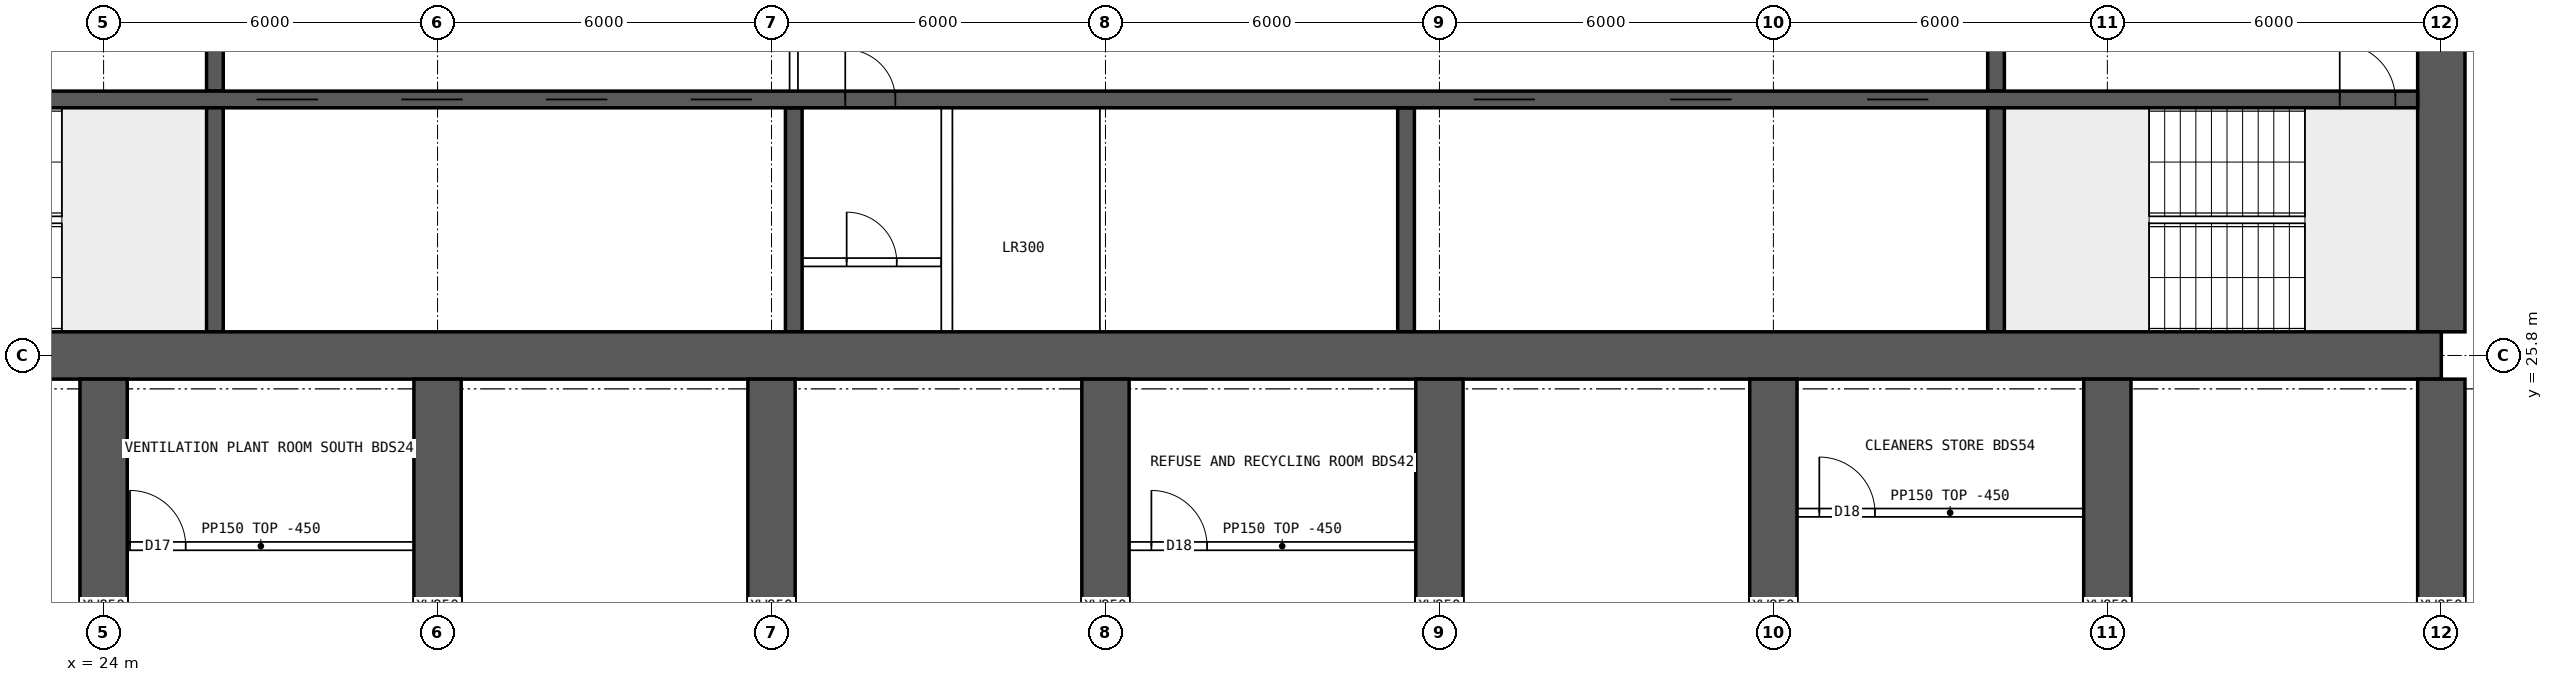
"""IFC4 building model, lengths in metres.
Left out: names, types, materials, properties, quantities, classifications, styles, units other than length and angle.
Written with IfcOpenShell. Run it as: python <this file> out.ifc"""

import sys

from ifc_helpers import new_model, si_unit, direction, frame, frame_2d, origin, place, context, subcontext, project, spatial, rectangle, extrude, element, fill, save


model = new_model("IFC4")
c1 = context("Model", 3, precision=1e-05, world=origin(), true_north=direction((0.0, 1.0)))
c2 = subcontext(c1, "Body", "Model", "MODEL_VIEW")
j1 = project(units=[si_unit("LENGTHUNIT", "METRE"), si_unit("PLANEANGLEUNIT", "RADIAN")], contexts=[c1])
p1 = place(None, origin())
s1 = spatial("IfcSite", under=j1, at=p1, CompositionType="ELEMENT")
p2 = place(p1, origin())
s2 = spatial("IfcBuilding", under=s1, at=p2, CompositionType="ELEMENT")
p3 = place(p2, frame((0.0, 0.0, 144.85)))
s3 = spatial("IfcBuildingStorey", under=s2, at=p3, CompositionType="ELEMENT", Elevation=144.85)
p4 = place(p3, frame((18.0, 25.8, 0.0), z_axis=(0.0, 0.0, 1.0), x_axis=(1.0, 0.0, 0.0)))
e1 = element("IfcWall", 1, at=p4, inside=s3, PredefinedType="SHEAR", context=c2, shape_type="SweptSolid", body=[
    extrude(rectangle(XDim=48.0, YDim=0.85, at=frame_2d((24.0, 0.0))), origin(), (0.0, 0.0, 1.0), 3.75),
])
p5 = place(p3, frame((66.0, 26.225, 0.0), z_axis=(0.0, 0.0, 1.0), x_axis=(0.0, 1.0, 0.0)))
e2 = element("IfcWall", 2, at=p5, inside=s3, PredefinedType="SHEAR", context=c2, shape_type="SweptSolid", body=[
    extrude(rectangle(XDim=11.55, YDim=0.85, at=frame_2d((5.775, 0.0))), origin(), (0.0, 0.0, 1.0), 3.75),
])
p6 = place(p5, frame((5.075, 0.0, 0.0)))
e3 = element("IfcOpeningElement", 3, at=p6, cuts=e2, PredefinedType="OPENING", context=c2, shape_type="SweptSolid", body=[
    extrude(rectangle(XDim=1.2, YDim=2.1, at=frame_2d((0.6, 1.05))), frame((0.0, 0.435, 0.0), z_axis=(0.0, -1.0, 0.0), x_axis=(1.0, 0.0, 0.0)), (0.0, 0.0, 1.0), 0.87),
])
p7 = place(p3, frame((18.425, 30.4, 0.0), z_axis=(0.0, 0.0, 1.0), x_axis=(1.0, 0.0, 0.0)))
e4 = element("IfcWall", 4, at=p7, inside=s3, PredefinedType="SHEAR", context=c2, shape_type="SweptSolid", body=[
    extrude(rectangle(XDim=47.15, YDim=0.3, at=frame_2d((23.575, 0.0))), origin(), (0.0, 0.0, 1.0), 3.75),
])
p8 = place(p7, frame((0.4, 0.0, 0.0)))
e5 = element("IfcOpeningElement", 5, at=p8, cuts=e4, PredefinedType="OPENING", context=c2, shape_type="SweptSolid", body=[
    extrude(rectangle(XDim=1.0, YDim=2.1, at=frame_2d((0.5, 1.05))), frame((0.0, 0.16, 0.0), z_axis=(0.0, -1.0, 0.0), x_axis=(1.0, 0.0, 0.0)), (0.0, 0.0, 1.0), 0.32),
])
p9 = place(p7, frame((45.75, 0.0, 0.0)))
e6 = element("IfcOpeningElement", 6, at=p9, cuts=e4, PredefinedType="OPENING", context=c2, shape_type="SweptSolid", body=[
    extrude(rectangle(XDim=1.0, YDim=2.1, at=frame_2d((0.5, 1.05))), frame((0.0, 0.16, 0.0), z_axis=(0.0, -1.0, 0.0), x_axis=(1.0, 0.0, 0.0)), (0.0, 0.0, 1.0), 0.32),
])
p10 = place(p7, frame((8.325, 0.0, 0.0)))
e7 = element("IfcOpeningElement", 7, at=p10, cuts=e4, PredefinedType="OPENING", context=c2, shape_type="SweptSolid", body=[
    extrude(rectangle(XDim=1.1, YDim=2.1, at=frame_2d((0.55, 1.05))), frame((0.0, 0.16, 0.0), z_axis=(0.0, -1.0, 0.0), x_axis=(1.0, 0.0, 0.0)), (0.0, 0.0, 1.0), 0.32),
])
p11 = place(p7, frame((10.925, 0.0, 0.0)))
e8 = element("IfcOpeningElement", 8, at=p11, cuts=e4, PredefinedType="OPENING", context=c2, shape_type="SweptSolid", body=[
    extrude(rectangle(XDim=1.1, YDim=2.1, at=frame_2d((0.55, 1.05))), frame((0.0, 0.16, 0.0), z_axis=(0.0, -1.0, 0.0), x_axis=(1.0, 0.0, 0.0)), (0.0, 0.0, 1.0), 0.32),
])
p12 = place(p7, frame((13.525, 0.0, 0.0)))
e9 = element("IfcOpeningElement", 9, at=p12, cuts=e4, PredefinedType="OPENING", context=c2, shape_type="SweptSolid", body=[
    extrude(rectangle(XDim=1.1, YDim=2.1, at=frame_2d((0.55, 1.05))), frame((0.0, 0.16, 0.0), z_axis=(0.0, -1.0, 0.0), x_axis=(1.0, 0.0, 0.0)), (0.0, 0.0, 1.0), 0.32),
])
p13 = place(p7, frame((16.125, 0.0, 0.0)))
e10 = element("IfcOpeningElement", 10, at=p13, cuts=e4, PredefinedType="OPENING", context=c2, shape_type="SweptSolid", body=[
    extrude(rectangle(XDim=1.1, YDim=2.1, at=frame_2d((0.55, 1.05))), frame((0.0, 0.16, 0.0), z_axis=(0.0, -1.0, 0.0), x_axis=(1.0, 0.0, 0.0)), (0.0, 0.0, 1.0), 0.32),
])
p14 = place(p7, frame((18.9, 0.0, 0.0)))
e11 = element("IfcOpeningElement", 11, at=p14, cuts=e4, PredefinedType="OPENING", context=c2, shape_type="SweptSolid", body=[
    extrude(rectangle(XDim=0.9, YDim=2.1, at=frame_2d((0.45, 1.05))), frame((0.0, 0.16, 0.0), z_axis=(0.0, -1.0, 0.0), x_axis=(1.0, 0.0, 0.0)), (0.0, 0.0, 1.0), 0.32),
])
p15 = place(p7, frame((30.192, 0.0, 0.0)))
e12 = element("IfcOpeningElement", 12, at=p15, cuts=e4, PredefinedType="OPENING", context=c2, shape_type="SweptSolid", body=[
    extrude(rectangle(XDim=1.1, YDim=2.1, at=frame_2d((0.55, 1.05))), frame((0.0, 0.16, 0.0), z_axis=(0.0, -1.0, 0.0), x_axis=(1.0, 0.0, 0.0)), (0.0, 0.0, 1.0), 0.32),
])
p16 = place(p7, frame((33.725, 0.0, 0.0)))
e13 = element("IfcOpeningElement", 13, at=p16, cuts=e4, PredefinedType="OPENING", context=c2, shape_type="SweptSolid", body=[
    extrude(rectangle(XDim=1.1, YDim=2.1, at=frame_2d((0.55, 1.05))), frame((0.0, 0.16, 0.0), z_axis=(0.0, -1.0, 0.0), x_axis=(1.0, 0.0, 0.0)), (0.0, 0.0, 1.0), 0.32),
])
p17 = place(p7, frame((37.258, 0.0, 0.0)))
e14 = element("IfcOpeningElement", 14, at=p17, cuts=e4, PredefinedType="OPENING", context=c2, shape_type="SweptSolid", body=[
    extrude(rectangle(XDim=1.1, YDim=2.1, at=frame_2d((0.55, 1.05))), frame((0.0, 0.16, 0.0), z_axis=(0.0, -1.0, 0.0), x_axis=(1.0, 0.0, 0.0)), (0.0, 0.0, 1.0), 0.32),
])
for number, where, z_axis, x_axis in (
    (15, (26.0, 26.225, 0.0), (0.0, 0.0, 1.0), (0.0, 1.0, 0.0)),
    (16, (58.0, 26.225, 0.0), (0.0, 0.0, 1.0), (0.0, 1.0, 0.0)),
):
    element("IfcWall", number, at=place(p3, frame(where, z_axis=z_axis, x_axis=x_axis)), inside=s3, PredefinedType="SHEAR", context=c2, shape_type="SweptSolid", body=[
        extrude(rectangle(XDim=4.025, YDim=0.3, at=frame_2d((2.012, 0.0))), origin(), (0.0, 0.0, 1.0), 3.75),
    ])
p18 = place(p3, frame((26.0, 30.55, 0.0), z_axis=(0.0, 0.0, 1.0), x_axis=(0.0, 1.0, 0.0)))
e17 = element("IfcWall", 17, at=p18, inside=s3, PredefinedType="SHEAR", context=c2, shape_type="SweptSolid", body=[
    extrude(rectangle(XDim=3.9, YDim=0.3, at=frame_2d((1.95, 0.0))), origin(), (0.0, 0.0, 1.0), 3.75),
])
p19 = place(p18, frame((1.4, 0.0, 0.0)))
e18 = element("IfcOpeningElement", 18, at=p19, cuts=e17, PredefinedType="OPENING", context=c2, shape_type="SweptSolid", body=[
    extrude(rectangle(XDim=1.2, YDim=2.1, at=frame_2d((0.6, 1.05))), frame((0.0, 0.16, 0.0), z_axis=(0.0, -1.0, 0.0), x_axis=(1.0, 0.0, 0.0)), (0.0, 0.0, 1.0), 0.32),
])
p20 = place(p3, frame((58.0, 30.55, 0.0), z_axis=(0.0, 0.0, 1.0), x_axis=(0.0, 1.0, 0.0)))
e19 = element("IfcWall", 19, at=p20, inside=s3, PredefinedType="SHEAR", context=c2, shape_type="SweptSolid", body=[
    extrude(rectangle(XDim=3.9, YDim=0.3, at=frame_2d((1.95, 0.0))), origin(), (0.0, 0.0, 1.0), 3.75),
])
p21 = place(p20, frame((1.4, 0.0, 0.0)))
e20 = element("IfcOpeningElement", 20, at=p21, cuts=e19, PredefinedType="OPENING", context=c2, shape_type="SweptSolid", body=[
    extrude(rectangle(XDim=1.2, YDim=2.1, at=frame_2d((0.6, 1.05))), frame((0.0, 0.16, 0.0), z_axis=(0.0, -1.0, 0.0), x_axis=(1.0, 0.0, 0.0)), (0.0, 0.0, 1.0), 0.32),
])
for number, where, z_axis, x_axis in (
    (21, (36.4, 26.225, 0.0), (0.0, 0.0, 1.0), (0.0, 1.0, 0.0)),
    (22, (47.4, 26.225, 0.0), (0.0, 0.0, 1.0), (0.0, 1.0, 0.0)),
):
    element("IfcWall", number, at=place(p3, frame(where, z_axis=z_axis, x_axis=x_axis)), inside=s3, PredefinedType="SHEAR", context=c2, shape_type="SweptSolid", body=[
        extrude(rectangle(XDim=4.025, YDim=0.3, at=frame_2d((2.012, 0.0))), origin(), (0.0, 0.0, 1.0), 3.75),
    ])
for number, where, z_axis, x_axis in (
    (23, (24.0, 17.2, 0.0), (0.0, 0.0, 1.0), (0.0, 1.0, 0.0)),
    (24, (30.0, 17.2, 0.0), (0.0, 0.0, 1.0), (0.0, 1.0, 0.0)),
    (25, (36.0, 17.2, 0.0), (0.0, 0.0, 1.0), (0.0, 1.0, 0.0)),
    (26, (42.0, 17.2, 0.0), (0.0, 0.0, 1.0), (0.0, 1.0, 0.0)),
    (27, (48.0, 17.2, 0.0), (0.0, 0.0, 1.0), (0.0, 1.0, 0.0)),
    (28, (54.0, 17.2, 0.0), (0.0, 0.0, 1.0), (0.0, 1.0, 0.0)),
    (29, (60.0, 17.2, 0.0), (0.0, 0.0, 1.0), (0.0, 1.0, 0.0)),
    (30, (66.0, 17.2, 0.0), (0.0, 0.0, 1.0), (0.0, 1.0, 0.0)),
):
    element("IfcWall", number, at=place(p3, frame(where, z_axis=z_axis, x_axis=x_axis)), inside=s3, PredefinedType="SHEAR", context=c2, shape_type="SweptSolid", body=[
        extrude(rectangle(XDim=8.175, YDim=0.85, at=frame_2d((4.087, 0.0))), origin(), (0.0, 0.0, 1.0), 3.75),
    ])
p22 = place(p3, frame((36.4, 30.55, 0.0), z_axis=(0.0, 0.0, 1.0), x_axis=(0.0, 1.0, 0.0)))
e31 = element("IfcWall", 31, at=p22, inside=s3, PredefinedType="SOLIDWALL", context=c2, shape_type="SweptSolid", body=[
    extrude(rectangle(XDim=3.9, YDim=0.15, at=frame_2d((1.95, 0.0))), origin(), (0.0, 0.0, 1.0), 3.3),
])
p23 = place(p22, frame((1.15, 0.0, 0.0)))
e32 = element("IfcOpeningElement", 32, at=p23, cuts=e31, PredefinedType="OPENING", context=c2, shape_type="SweptSolid", body=[
    extrude(rectangle(XDim=1.6, YDim=2.1, at=frame_2d((0.8, 1.05))), frame((0.0, 0.085, 0.0), z_axis=(0.0, -1.0, 0.0), x_axis=(1.0, 0.0, 0.0)), (0.0, 0.0, 1.0), 0.17),
])
p24 = place(p3, frame((36.55, 27.475, 0.0), z_axis=(0.0, 0.0, 1.0), x_axis=(1.0, 0.0, 0.0)))
e33 = element("IfcWall", 33, at=p24, inside=s3, PredefinedType="SOLIDWALL", context=c2, shape_type="SweptSolid", body=[
    extrude(rectangle(XDim=2.5, YDim=0.15, at=frame_2d((1.25, 0.0))), origin(), (0.0, 0.0, 1.0), 3.3),
])
p25 = place(p24, frame((0.8, 0.0, 0.0)))
e34 = element("IfcOpeningElement", 34, at=p25, cuts=e33, PredefinedType="OPENING", context=c2, shape_type="SweptSolid", body=[
    extrude(rectangle(XDim=0.9, YDim=2.1, at=frame_2d((0.45, 1.05))), frame((0.0, 0.085, 0.0), z_axis=(0.0, -1.0, 0.0), x_axis=(1.0, 0.0, 0.0)), (0.0, 0.0, 1.0), 0.17),
])
p26 = place(p3, frame((39.15, 26.225, 0.0), z_axis=(0.0, 0.0, 1.0), x_axis=(0.0, 1.0, 0.0)))
e35 = element("IfcWall", 35, at=p26, inside=s3, PredefinedType="SOLIDWALL", context=c2, shape_type="SweptSolid", body=[
    extrude(rectangle(XDim=4.025, YDim=0.2, at=frame_2d((2.012, 0.0))), origin(), (0.0, 0.0, 1.0), 3.3),
])
p27 = place(p3, frame((24.075, 22.375, 0.0), z_axis=(0.0, 0.0, 1.0), x_axis=(1.0, 0.0, 0.0)))
e36 = element("IfcWall", 36, at=p27, inside=s3, PredefinedType="PARTITIONING", context=c2, shape_type="SweptSolid", body=[
    extrude(rectangle(XDim=5.5, YDim=0.15, at=frame_2d((2.75, 0.0))), origin(), (0.0, 0.0, 1.0), 3.3),
])
p28 = place(p27, frame((0.4, 0.0, 0.0)))
e37 = element("IfcOpeningElement", 37, at=p28, cuts=e36, PredefinedType="OPENING", context=c2, shape_type="SweptSolid", body=[
    extrude(rectangle(XDim=1.0, YDim=2.1, at=frame_2d((0.5, 1.05))), frame((0.0, 0.085, 0.0), z_axis=(0.0, -1.0, 0.0), x_axis=(1.0, 0.0, 0.0)), (0.0, 0.0, 1.0), 0.17),
])
p29 = place(p3, frame((42.425, 22.375, 0.0), z_axis=(0.0, 0.0, 1.0), x_axis=(1.0, 0.0, 0.0)))
e38 = element("IfcWall", 38, at=p29, inside=s3, PredefinedType="PARTITIONING", context=c2, shape_type="SweptSolid", body=[
    extrude(rectangle(XDim=5.5, YDim=0.15, at=frame_2d((2.75, 0.0))), origin(), (0.0, 0.0, 1.0), 3.3),
])
p30 = place(p29, frame((0.4, 0.0, 0.0)))
e39 = element("IfcOpeningElement", 39, at=p30, cuts=e38, PredefinedType="OPENING", context=c2, shape_type="SweptSolid", body=[
    extrude(rectangle(XDim=1.0, YDim=2.1, at=frame_2d((0.5, 1.05))), frame((0.0, 0.085, 0.0), z_axis=(0.0, -1.0, 0.0), x_axis=(1.0, 0.0, 0.0)), (0.0, 0.0, 1.0), 0.17),
])
p31 = place(p3, frame((54.425, 22.975, 0.0), z_axis=(0.0, 0.0, 1.0), x_axis=(1.0, 0.0, 0.0)))
e40 = element("IfcWall", 40, at=p31, inside=s3, PredefinedType="PARTITIONING", context=c2, shape_type="SweptSolid", body=[
    extrude(rectangle(XDim=5.5, YDim=0.15, at=frame_2d((2.75, 0.0))), origin(), (0.0, 0.0, 1.0), 3.3),
])
p32 = place(p31, frame((0.4, 0.0, 0.0)))
e41 = element("IfcOpeningElement", 41, at=p32, cuts=e40, PredefinedType="OPENING", context=c2, shape_type="SweptSolid", body=[
    extrude(rectangle(XDim=1.0, YDim=2.1, at=frame_2d((0.5, 1.05))), frame((0.0, 0.085, 0.0), z_axis=(0.0, -1.0, 0.0), x_axis=(1.0, 0.0, 0.0)), (0.0, 0.0, 1.0), 0.17),
])
p33 = place(p9, origin())
e42 = element("IfcDoor", 42, at=p33, inside=s3, OperationType="SINGLE_SWING_LEFT", PredefinedType="DOOR", context=c2, shape_type="SweptSolid", body=[
    extrude(rectangle(XDim=1.0, YDim=2.1, at=frame_2d((0.5, 1.05))), frame((0.0, 0.025, 0.0), z_axis=(0.0, -1.0, 0.0), x_axis=(1.0, 0.0, 0.0)), (0.0, 0.0, 1.0), 0.05),
])
fill(e6, e42)
p34 = place(p10, origin())
e43 = element("IfcDoor", 43, at=p34, inside=s3, OperationType="DOUBLE_DOOR_SLIDING", PredefinedType="DOOR", context=c2, shape_type="SweptSolid", body=[
    extrude(rectangle(XDim=1.1, YDim=2.1, at=frame_2d((0.55, 1.05))), frame((0.0, 0.025, 0.0), z_axis=(0.0, -1.0, 0.0), x_axis=(1.0, 0.0, 0.0)), (0.0, 0.0, 1.0), 0.05),
])
fill(e7, e43)
p35 = place(p11, origin())
e44 = element("IfcDoor", 44, at=p35, inside=s3, OperationType="DOUBLE_DOOR_SLIDING", PredefinedType="DOOR", context=c2, shape_type="SweptSolid", body=[
    extrude(rectangle(XDim=1.1, YDim=2.1, at=frame_2d((0.55, 1.05))), frame((0.0, 0.025, 0.0), z_axis=(0.0, -1.0, 0.0), x_axis=(1.0, 0.0, 0.0)), (0.0, 0.0, 1.0), 0.05),
])
fill(e8, e44)
p36 = place(p12, origin())
e45 = element("IfcDoor", 45, at=p36, inside=s3, OperationType="DOUBLE_DOOR_SLIDING", PredefinedType="DOOR", context=c2, shape_type="SweptSolid", body=[
    extrude(rectangle(XDim=1.1, YDim=2.1, at=frame_2d((0.55, 1.05))), frame((0.0, 0.025, 0.0), z_axis=(0.0, -1.0, 0.0), x_axis=(1.0, 0.0, 0.0)), (0.0, 0.0, 1.0), 0.05),
])
fill(e9, e45)
p37 = place(p13, origin())
e46 = element("IfcDoor", 46, at=p37, inside=s3, OperationType="DOUBLE_DOOR_SLIDING", PredefinedType="DOOR", context=c2, shape_type="SweptSolid", body=[
    extrude(rectangle(XDim=1.1, YDim=2.1, at=frame_2d((0.55, 1.05))), frame((0.0, 0.025, 0.0), z_axis=(0.0, -1.0, 0.0), x_axis=(1.0, 0.0, 0.0)), (0.0, 0.0, 1.0), 0.05),
])
fill(e10, e46)
p38 = place(p25, origin())
e47 = element("IfcDoor", 47, at=p38, inside=s3, OperationType="SINGLE_SWING_LEFT", PredefinedType="DOOR", context=c2, shape_type="SweptSolid", body=[
    extrude(rectangle(XDim=0.9, YDim=2.1, at=frame_2d((0.45, 1.05))), frame((0.0, 0.025, 0.0), z_axis=(0.0, -1.0, 0.0), x_axis=(1.0, 0.0, 0.0)), (0.0, 0.0, 1.0), 0.05),
])
fill(e34, e47)
p39 = place(p14, origin())
e48 = element("IfcDoor", 48, at=p39, inside=s3, OperationType="SINGLE_SWING_LEFT", PredefinedType="DOOR", context=c2, shape_type="SweptSolid", body=[
    extrude(rectangle(XDim=0.9, YDim=2.1, at=frame_2d((0.45, 1.05))), frame((0.0, 0.025, 0.0), z_axis=(0.0, -1.0, 0.0), x_axis=(1.0, 0.0, 0.0)), (0.0, 0.0, 1.0), 0.05),
])
fill(e11, e48)
p40 = place(p15, origin())
e49 = element("IfcDoor", 49, at=p40, inside=s3, OperationType="DOUBLE_DOOR_SLIDING", PredefinedType="DOOR", context=c2, shape_type="SweptSolid", body=[
    extrude(rectangle(XDim=1.1, YDim=2.1, at=frame_2d((0.55, 1.05))), frame((0.0, 0.025, 0.0), z_axis=(0.0, -1.0, 0.0), x_axis=(1.0, 0.0, 0.0)), (0.0, 0.0, 1.0), 0.05),
])
fill(e12, e49)
p41 = place(p16, origin())
e50 = element("IfcDoor", 50, at=p41, inside=s3, OperationType="DOUBLE_DOOR_SLIDING", PredefinedType="DOOR", context=c2, shape_type="SweptSolid", body=[
    extrude(rectangle(XDim=1.1, YDim=2.1, at=frame_2d((0.55, 1.05))), frame((0.0, 0.025, 0.0), z_axis=(0.0, -1.0, 0.0), x_axis=(1.0, 0.0, 0.0)), (0.0, 0.0, 1.0), 0.05),
])
fill(e13, e50)
p42 = place(p17, origin())
e51 = element("IfcDoor", 51, at=p42, inside=s3, OperationType="DOUBLE_DOOR_SLIDING", PredefinedType="DOOR", context=c2, shape_type="SweptSolid", body=[
    extrude(rectangle(XDim=1.1, YDim=2.1, at=frame_2d((0.55, 1.05))), frame((0.0, 0.025, 0.0), z_axis=(0.0, -1.0, 0.0), x_axis=(1.0, 0.0, 0.0)), (0.0, 0.0, 1.0), 0.05),
])
fill(e14, e51)
p43 = place(p28, origin())
e52 = element("IfcDoor", 52, at=p43, inside=s3, OperationType="SINGLE_SWING_LEFT", PredefinedType="DOOR", context=c2, shape_type="SweptSolid", body=[
    extrude(rectangle(XDim=1.0, YDim=2.1, at=frame_2d((0.5, 1.05))), frame((0.0, 0.025, 0.0), z_axis=(0.0, -1.0, 0.0), x_axis=(1.0, 0.0, 0.0)), (0.0, 0.0, 1.0), 0.05),
])
fill(e37, e52)
p44 = place(p30, origin())
e53 = element("IfcDoor", 53, at=p44, inside=s3, OperationType="SINGLE_SWING_LEFT", PredefinedType="DOOR", context=c2, shape_type="SweptSolid", body=[
    extrude(rectangle(XDim=1.0, YDim=2.1, at=frame_2d((0.5, 1.05))), frame((0.0, 0.025, 0.0), z_axis=(0.0, -1.0, 0.0), x_axis=(1.0, 0.0, 0.0)), (0.0, 0.0, 1.0), 0.05),
])
fill(e39, e53)
p45 = place(p32, origin())
e54 = element("IfcDoor", 54, at=p45, inside=s3, OperationType="SINGLE_SWING_LEFT", PredefinedType="DOOR", context=c2, shape_type="SweptSolid", body=[
    extrude(rectangle(XDim=1.0, YDim=2.1, at=frame_2d((0.5, 1.05))), frame((0.0, 0.025, 0.0), z_axis=(0.0, -1.0, 0.0), x_axis=(1.0, 0.0, 0.0)), (0.0, 0.0, 1.0), 0.05),
])
fill(e41, e54)
save(model, sys.argv[1])
